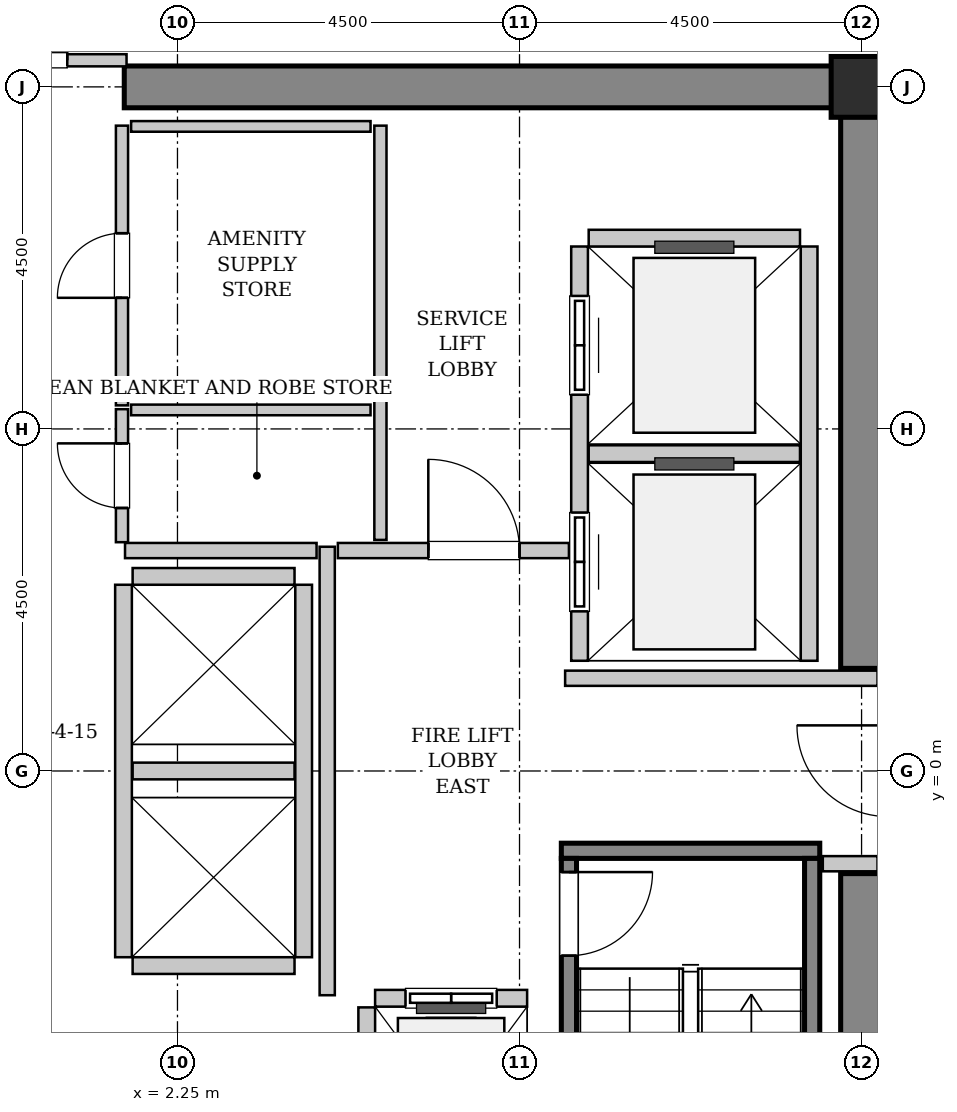
"""IFC4 building model, lengths in metres.
Left out: names, types, materials, properties, quantities, classifications, styles, units other than length and angle.
Written with IfcOpenShell. Run it as: python <this file> out.ifc"""

import sys

from ifc_helpers import new_model, si_unit, direction, frame, frame_2d, origin, origin_2d, place, context, subcontext, project, spatial, rectangle, hollow_rectangle, extrude, source, transform, mapped, element, fill, save


model = new_model("IFC4")
c1 = context("Model", 3, precision=1e-05, world=origin(), true_north=direction((0.0, 1.0)))
c2 = subcontext(c1, "Body", "Model", "MODEL_VIEW")
j1 = project(units=[si_unit("LENGTHUNIT", "METRE"), si_unit("PLANEANGLEUNIT", "RADIAN")], contexts=[c1])
p1 = place(None, origin())
s1 = spatial("IfcSite", under=j1, at=p1, CompositionType="ELEMENT")
p2 = place(p1, origin())
s2 = spatial("IfcBuilding", under=s1, at=p2, CompositionType="ELEMENT")
p3 = place(p2, frame((0.0, 0.0, 186.8)))
s3 = spatial("IfcBuildingStorey", under=s2, at=p3, CompositionType="ELEMENT", Elevation=186.8)
m1 = source(origin(), c2, "Body", "SweptSolid", [
    extrude(rectangle(XDim=9.975, YDim=0.55, at=frame_2d((4.987, 0.0))), origin(), (0.0, 0.0, 1.0), 3.8),
])
p4 = place(p3, frame((1.55, 9.0, 0.0), z_axis=(0.0, 0.0, 1.0), x_axis=(1.0, 0.0, 0.0)))
e1 = element("IfcWall", 1, at=p4, inside=s3, PredefinedType="SHEAR", context=c2, shape_type="MappedRepresentation", body=[
    mapped(m1, transform((0.0, 0.0, 0.0), x_axis=(1.0, 0.0, 0.0), y_axis=(0.0, 1.0, 0.0), z_axis=(0.0, 0.0, 1.0), scale=1.0)),
])
m2 = source(origin(), c2, "Body", "SweptSolid", [
    extrude(rectangle(XDim=7.375, YDim=0.55, at=frame_2d((3.688, 0.0))), origin(), (0.0, 0.0, 1.0), 3.8),
])
for number, where, z_axis, x_axis in (
    (2, (11.25, -8.725, 0.0), (0.0, 0.0, 1.0), (0.0, 1.0, 0.0)),
    (3, (11.25, 1.35, 0.0), (0.0, 0.0, 1.0), (0.0, 1.0, 0.0)),
):
    element("IfcWall", number, at=place(p3, frame(where, z_axis=z_axis, x_axis=x_axis)), inside=s3, PredefinedType="SHEAR", context=c2, shape_type="MappedRepresentation", body=[
        mapped(m2, transform((0.0, 0.0, 0.0), x_axis=(1.0, 0.0, 0.0), y_axis=(0.0, 1.0, 0.0), z_axis=(0.0, 0.0, 1.0), scale=1.0)),
    ])
m3 = source(origin(), c2, "Body", "SweptSolid", [
    extrude(hollow_rectangle(XDim=0.8, YDim=0.8, WallThickness=0.04, InnerFilletRadius=0.04, OuterFilletRadius=0.08, at=origin_2d()), origin(), (0.0, 0.0, 1.0), 3.8),
])
p5 = place(p3, frame((11.25, 9.0, 0.0), z_axis=(0.0, 0.0, 1.0), x_axis=(1.0, 0.0, 0.0)))
e4 = element("IfcColumn", 4, at=p5, inside=s3, PredefinedType="COLUMN", context=c2, shape_type="MappedRepresentation", body=[
    mapped(m3, transform((0.0, 0.0, 0.0), x_axis=(1.0, 0.0, 0.0), y_axis=(0.0, 1.0, 0.0), z_axis=(0.0, 0.0, 1.0), scale=1.0)),
])
m4 = source(origin(), c2, "Body", "SweptSolid", [
    extrude(rectangle(XDim=3.4, YDim=0.2, at=frame_2d((1.7, 0.0))), origin(), (0.0, 0.0, 1.0), 3.8),
])
p6 = place(p3, frame((7.3, -1.05, 0.0), z_axis=(0.0, 0.0, 1.0), x_axis=(1.0, 0.0, 0.0)))
e5 = element("IfcWall", 5, at=p6, inside=s3, PredefinedType="SOLIDWALL", context=c2, shape_type="MappedRepresentation", body=[
    mapped(m4, transform((0.0, 0.0, 0.0), x_axis=(1.0, 0.0, 0.0), y_axis=(0.0, 1.0, 0.0), z_axis=(0.0, 0.0, 1.0), scale=1.0)),
])
m5 = source(origin(), c2, "Body", "SweptSolid", [
    extrude(rectangle(XDim=7.1, YDim=0.2, at=frame_2d((3.55, 0.0))), origin(), (0.0, 0.0, 1.0), 3.8),
])
p7 = place(p3, frame((7.4, -1.15, 0.0), z_axis=(0.0, 0.0, 1.0), x_axis=(0.0, -1.0, 0.0)))
e6 = element("IfcWall", 6, at=p7, inside=s3, PredefinedType="SOLIDWALL", context=c2, shape_type="MappedRepresentation", body=[
    mapped(m5, transform((0.0, 0.0, 0.0), x_axis=(1.0, 0.0, 0.0), y_axis=(0.0, 1.0, 0.0), z_axis=(0.0, 0.0, 1.0), scale=1.0)),
])
p8 = place(p7, frame((0.18, 0.0, 0.0)))
e7 = element("IfcOpeningElement", 7, at=p8, cuts=e6, PredefinedType="OPENING", context=c2, shape_type="SweptSolid", body=[
    extrude(rectangle(XDim=1.1, YDim=2.15, at=frame_2d((0.55, 1.075))), frame((0.0, 0.11, 0.0), z_axis=(0.0, -1.0, 0.0), x_axis=(1.0, 0.0, 0.0)), (0.0, 0.0, 1.0), 0.22),
])
p9 = place(p3, frame((10.6, -1.15, 0.0), z_axis=(0.0, 0.0, 1.0), x_axis=(0.0, -1.0, 0.0)))
e8 = element("IfcWall", 8, at=p9, inside=s3, PredefinedType="SOLIDWALL", context=c2, shape_type="MappedRepresentation", body=[
    mapped(m5, transform((0.0, 0.0, 0.0), x_axis=(1.0, 0.0, 0.0), y_axis=(0.0, 1.0, 0.0), z_axis=(0.0, 0.0, 1.0), scale=1.0)),
])
m6 = source(origin(), c2, "Body", "SweptSolid", [
    extrude(rectangle(XDim=2.0, YDim=0.22, at=frame_2d((1.0, 0.0))), origin(), (0.0, 0.0, 1.0), 3.535),
])
p10 = place(p3, frame((6.85, -2.99, 0.0), z_axis=(0.0, 0.0, 1.0), x_axis=(-1.0, 0.0, 0.0)))
e9 = element("IfcWall", 9, at=p10, inside=s3, PredefinedType="SOLIDWALL", context=c2, shape_type="MappedRepresentation", body=[
    mapped(m6, transform((0.0, 0.0, 0.0), x_axis=(1.0, 0.0, 0.0), y_axis=(0.0, 1.0, 0.0), z_axis=(0.0, 0.0, 1.0), scale=1.0)),
])
p11 = place(p10, frame((0.4, 0.0, 0.0)))
e10 = element("IfcOpeningElement", 10, at=p11, cuts=e9, PredefinedType="OPENING", context=c2, shape_type="SweptSolid", body=[
    extrude(rectangle(XDim=1.2, YDim=2.2, at=frame_2d((0.6, 1.1))), frame((0.0, 0.12, 0.0), z_axis=(0.0, -1.0, 0.0), x_axis=(1.0, 0.0, 0.0)), (0.0, 0.0, 1.0), 0.24),
])
m7 = source(origin(), c2, "Body", "SweptSolid", [
    extrude(rectangle(XDim=2.68, YDim=0.22, at=frame_2d((1.34, 0.0))), origin(), (0.0, 0.0, 1.0), 3.535),
])
p12 = place(p3, frame((4.74, -3.11, 0.0), z_axis=(0.0, 0.0, 1.0), x_axis=(0.0, -1.0, 0.0)))
e11 = element("IfcWall", 11, at=p12, inside=s3, PredefinedType="SOLIDWALL", context=c2, shape_type="MappedRepresentation", body=[
    mapped(m7, transform((0.0, 0.0, 0.0), x_axis=(1.0, 0.0, 0.0), y_axis=(0.0, 1.0, 0.0), z_axis=(0.0, 0.0, 1.0), scale=1.0)),
])
m8 = source(origin(), c2, "Body", "SweptSolid", [
    extrude(rectangle(XDim=5.45, YDim=0.22, at=frame_2d((2.725, 0.0))), origin(), (0.0, 0.0, 1.0), 3.535),
])
p13 = place(p3, frame((7.54, 6.9, 0.0), z_axis=(0.0, 0.0, 1.0), x_axis=(0.0, -1.0, 0.0)))
e12 = element("IfcWall", 12, at=p13, inside=s3, PredefinedType="SOLIDWALL", context=c2, shape_type="MappedRepresentation", body=[
    mapped(m8, transform((0.0, 0.0, 0.0), x_axis=(1.0, 0.0, 0.0), y_axis=(0.0, 1.0, 0.0), z_axis=(0.0, 0.0, 1.0), scale=1.0)),
])
p14 = place(p13, frame((3.5, 0.0, 0.0)))
e13 = element("IfcOpeningElement", 13, at=p14, cuts=e12, PredefinedType="OPENING", context=c2, shape_type="SweptSolid", body=[
    extrude(rectangle(XDim=1.3, YDim=2.3, at=frame_2d((0.65, 1.15))), frame((0.0, 0.12, 0.0), z_axis=(0.0, -1.0, 0.0), x_axis=(1.0, 0.0, 0.0)), (0.0, 0.0, 1.0), 0.24),
])
p15 = place(p13, frame((0.65, 0.0, 0.0)))
e14 = element("IfcOpeningElement", 14, at=p15, cuts=e12, PredefinedType="OPENING", context=c2, shape_type="SweptSolid", body=[
    extrude(rectangle(XDim=1.3, YDim=2.3, at=frame_2d((0.65, 1.15))), frame((0.0, 0.12, 0.0), z_axis=(0.0, -1.0, 0.0), x_axis=(1.0, 0.0, 0.0)), (0.0, 0.0, 1.0), 0.24),
])
p16 = place(p3, frame((10.56, 1.45, 0.0), z_axis=(0.0, 0.0, 1.0), x_axis=(0.0, 1.0, 0.0)))
e15 = element("IfcWall", 15, at=p16, inside=s3, PredefinedType="SOLIDWALL", context=c2, shape_type="MappedRepresentation", body=[
    mapped(m8, transform((0.0, 0.0, 0.0), x_axis=(1.0, 0.0, 0.0), y_axis=(0.0, 1.0, 0.0), z_axis=(0.0, 0.0, 1.0), scale=1.0)),
])
m9 = source(origin(), c2, "Body", "SweptSolid", [
    extrude(rectangle(XDim=2.78, YDim=0.22, at=frame_2d((1.39, 0.0))), origin(), (0.0, 0.0, 1.0), 3.535),
])
for number, where, z_axis, x_axis in (
    (16, (7.66, 4.175, 0.0), (0.0, 0.0, 1.0), (1.0, 0.0, 0.0)),
    (17, (10.44, 7.01, 0.0), (0.0, 0.0, 1.0), (-1.0, 0.0, 0.0)),
):
    element("IfcWall", number, at=place(p3, frame(where, z_axis=z_axis, x_axis=x_axis)), inside=s3, PredefinedType="SOLIDWALL", context=c2, shape_type="MappedRepresentation", body=[
        mapped(m9, transform((0.0, 0.0, 0.0), x_axis=(1.0, 0.0, 0.0), y_axis=(0.0, 1.0, 0.0), z_axis=(0.0, 0.0, 1.0), scale=1.0)),
    ])
m10 = source(origin(), c2, "Body", "SweptSolid", [
    extrude(rectangle(XDim=4.9, YDim=0.22, at=frame_2d((2.45, 0.0))), origin(), (0.0, 0.0, 1.0), 3.535),
])
for number, where, z_axis, x_axis in (
    (18, (1.54, 2.45, 0.0), (0.0, 0.0, 1.0), (0.0, -1.0, 0.0)),
    (19, (3.91, -2.45, 0.0), (0.0, 0.0, 1.0), (0.0, 1.0, 0.0)),
):
    element("IfcWall", number, at=place(p3, frame(where, z_axis=z_axis, x_axis=x_axis)), inside=s3, PredefinedType="SOLIDWALL", context=c2, shape_type="MappedRepresentation", body=[
        mapped(m10, transform((0.0, 0.0, 0.0), x_axis=(1.0, 0.0, 0.0), y_axis=(0.0, 1.0, 0.0), z_axis=(0.0, 0.0, 1.0), scale=1.0)),
    ])
m11 = source(origin(), c2, "Body", "SweptSolid", [
    extrude(rectangle(XDim=2.13, YDim=0.22, at=frame_2d((1.065, 0.0))), origin(), (0.0, 0.0, 1.0), 3.535),
])
for number, where, z_axis, x_axis in (
    (20, (1.66, -2.56, 0.0), (0.0, 0.0, 1.0), (1.0, 0.0, 0.0)),
    (21, (1.66, 0.0, 0.0), (0.0, 0.0, 1.0), (1.0, 0.0, 0.0)),
    (22, (3.79, 2.56, 0.0), (0.0, 0.0, 1.0), (-1.0, 0.0, 0.0)),
):
    element("IfcWall", number, at=place(p3, frame(where, z_axis=z_axis, x_axis=x_axis)), inside=s3, PredefinedType="SOLIDWALL", context=c2, shape_type="MappedRepresentation", body=[
        mapped(m11, transform((0.0, 0.0, 0.0), x_axis=(1.0, 0.0, 0.0), y_axis=(0.0, 1.0, 0.0), z_axis=(0.0, 0.0, 1.0), scale=1.0)),
    ])
m12 = source(origin(), c2, "Body", "SweptSolid", [
    extrude(rectangle(XDim=5.9, YDim=0.2, at=frame_2d((2.95, 0.0))), origin(), (0.0, 0.0, 1.0), 3.535),
])
p17 = place(p3, frame((4.22, -2.95, 0.0), z_axis=(0.0, 0.0, 1.0), x_axis=(0.0, 1.0, 0.0)))
e23 = element("IfcWall", 23, at=p17, inside=s3, PredefinedType="PARTITIONING", context=c2, shape_type="MappedRepresentation", body=[
    mapped(m12, transform((0.0, 0.0, 0.0), x_axis=(1.0, 0.0, 0.0), y_axis=(0.0, 1.0, 0.0), z_axis=(0.0, 0.0, 1.0), scale=1.0)),
])
m13 = source(origin(), c2, "Body", "SweptSolid", [
    extrude(rectangle(XDim=2.52, YDim=0.2, at=frame_2d((1.26, 0.0))), origin(), (0.0, 0.0, 1.0), 3.535),
])
p18 = place(p3, frame((1.56, 2.9, 0.0), z_axis=(0.0, 0.0, 1.0), x_axis=(1.0, 0.0, 0.0)))
e24 = element("IfcWall", 24, at=p18, inside=s3, PredefinedType="PARTITIONING", context=c2, shape_type="MappedRepresentation", body=[
    mapped(m13, transform((0.0, 0.0, 0.0), x_axis=(1.0, 0.0, 0.0), y_axis=(0.0, 1.0, 0.0), z_axis=(0.0, 0.0, 1.0), scale=1.0)),
])
m14 = source(origin(), c2, "Body", "SweptSolid", [
    extrude(rectangle(XDim=3.04, YDim=0.2, at=frame_2d((1.52, 0.0))), origin(), (0.0, 0.0, 1.0), 3.535),
])
p19 = place(p3, frame((4.36, 2.9, 0.0), z_axis=(0.0, 0.0, 1.0), x_axis=(1.0, 0.0, 0.0)))
e25 = element("IfcWall", 25, at=p19, inside=s3, PredefinedType="PARTITIONING", context=c2, shape_type="MappedRepresentation", body=[
    mapped(m14, transform((0.0, 0.0, 0.0), x_axis=(1.0, 0.0, 0.0), y_axis=(0.0, 1.0, 0.0), z_axis=(0.0, 0.0, 1.0), scale=1.0)),
])
p20 = place(p19, frame((1.19, 0.0, 0.0)))
e26 = element("IfcOpeningElement", 26, at=p20, cuts=e25, PredefinedType="OPENING", context=c2, shape_type="SweptSolid", body=[
    extrude(rectangle(XDim=1.2, YDim=2.15, at=frame_2d((0.6, 1.075))), frame((0.0, 0.11, 0.0), z_axis=(0.0, -1.0, 0.0), x_axis=(1.0, 0.0, 0.0)), (0.0, 0.0, 1.0), 0.22),
])
m15 = source(origin(), c2, "Body", "SweptSolid", [
    extrude(rectangle(XDim=4.11, YDim=0.2, at=frame_2d((2.055, 0.0))), origin(), (0.0, 0.0, 1.0), 3.535),
])
p21 = place(p3, frame((7.35, 1.22, 0.0), z_axis=(0.0, 0.0, 1.0), x_axis=(1.0, 0.0, 0.0)))
e27 = element("IfcWall", 27, at=p21, inside=s3, PredefinedType="PARTITIONING", context=c2, shape_type="MappedRepresentation", body=[
    mapped(m15, transform((0.0, 0.0, 0.0), x_axis=(1.0, 0.0, 0.0), y_axis=(0.0, 1.0, 0.0), z_axis=(0.0, 0.0, 1.0), scale=1.0)),
])
m16 = source(origin(), c2, "Body", "SweptSolid", [
    extrude(rectangle(XDim=0.72, YDim=0.2, at=frame_2d((0.36, 0.0))), origin(), (0.0, 0.0, 1.0), 3.535),
])
p22 = place(p3, frame((10.74, -1.22, 0.0), z_axis=(0.0, 0.0, 1.0), x_axis=(1.0, 0.0, 0.0)))
e28 = element("IfcWall", 28, at=p22, inside=s3, PredefinedType="PARTITIONING", context=c2, shape_type="MappedRepresentation", body=[
    mapped(m16, transform((0.0, 0.0, 0.0), x_axis=(1.0, 0.0, 0.0), y_axis=(0.0, 1.0, 0.0), z_axis=(0.0, 0.0, 1.0), scale=1.0)),
])
m17 = source(origin(), c2, "Body", "SweptSolid", [
    extrude(rectangle(XDim=3.16, YDim=0.16, at=frame_2d((1.58, 0.0))), origin(), (0.0, 0.0, 1.0), 2.425),
])
p23 = place(p3, frame((-1.58, 9.35, 0.0), z_axis=(0.0, 0.0, 1.0), x_axis=(1.0, 0.0, 0.0)))
e29 = element("IfcWall", 29, at=p23, inside=s3, PredefinedType="PARTITIONING", context=c2, shape_type="MappedRepresentation", body=[
    mapped(m17, transform((0.0, 0.0, 0.0), x_axis=(1.0, 0.0, 0.0), y_axis=(0.0, 1.0, 0.0), z_axis=(0.0, 0.0, 1.0), scale=1.0)),
])
p24 = place(p23, frame((0.78, 0.0, 0.0)))
e30 = element("IfcOpeningElement", 30, at=p24, cuts=e29, PredefinedType="OPENING", context=c2, shape_type="SweptSolid", body=[
    extrude(rectangle(XDim=1.6, YDim=2.3, at=frame_2d((0.8, 1.15))), frame((0.0, 0.09, 0.0), z_axis=(0.0, -1.0, 0.0), x_axis=(1.0, 0.0, 0.0)), (0.0, 0.0, 1.0), 0.18),
])
m18 = source(origin(), c2, "Body", "SweptSolid", [
    extrude(rectangle(XDim=5.45, YDim=0.16, at=frame_2d((2.725, 0.0))), origin(), (0.0, 0.0, 1.0), 3.535),
])
p25 = place(p3, frame((4.92, 3.04, 0.0), z_axis=(0.0, 0.0, 1.0), x_axis=(0.0, 1.0, 0.0)))
e31 = element("IfcWall", 31, at=p25, inside=s3, PredefinedType="PARTITIONING", context=c2, shape_type="MappedRepresentation", body=[
    mapped(m18, transform((0.0, 0.0, 0.0), x_axis=(1.0, 0.0, 0.0), y_axis=(0.0, 1.0, 0.0), z_axis=(0.0, 0.0, 1.0), scale=1.0)),
])
m19 = source(origin(), c2, "Body", "SweptSolid", [
    extrude(rectangle(XDim=1.75, YDim=0.16, at=frame_2d((0.875, 0.0))), origin(), (0.0, 0.0, 1.0), 3.535),
])
p26 = place(p3, frame((1.52, 3.01, 0.0), z_axis=(0.0, 0.0, 1.0), x_axis=(0.0, 1.0, 0.0)))
e32 = element("IfcWall", 32, at=p26, inside=s3, PredefinedType="PARTITIONING", context=c2, shape_type="MappedRepresentation", body=[
    mapped(m19, transform((0.0, 0.0, 0.0), x_axis=(1.0, 0.0, 0.0), y_axis=(0.0, 1.0, 0.0), z_axis=(0.0, 0.0, 1.0), scale=1.0)),
])
p27 = place(p26, frame((0.45, 0.0, 0.0)))
e33 = element("IfcOpeningElement", 33, at=p27, cuts=e32, PredefinedType="OPENING", context=c2, shape_type="SweptSolid", body=[
    extrude(rectangle(XDim=0.85, YDim=2.1, at=frame_2d((0.425, 1.05))), frame((0.0, 0.09, 0.0), z_axis=(0.0, -1.0, 0.0), x_axis=(1.0, 0.0, 0.0)), (0.0, 0.0, 1.0), 0.18),
])
m20 = source(origin(), c2, "Body", "SweptSolid", [
    extrude(rectangle(XDim=3.15, YDim=0.14, at=frame_2d((1.575, 0.0))), origin(), (0.0, 0.0, 1.0), 3.535),
])
p28 = place(p3, frame((1.64, 4.75, 0.0), z_axis=(0.0, 0.0, 1.0), x_axis=(1.0, 0.0, 0.0)))
e34 = element("IfcWall", 34, at=p28, inside=s3, PredefinedType="PARTITIONING", context=c2, shape_type="MappedRepresentation", body=[
    mapped(m20, transform((0.0, 0.0, 0.0), x_axis=(1.0, 0.0, 0.0), y_axis=(0.0, 1.0, 0.0), z_axis=(0.0, 0.0, 1.0), scale=1.0)),
])
m21 = source(origin(), c2, "Body", "SweptSolid", [
    extrude(rectangle(XDim=3.68, YDim=0.16, at=frame_2d((1.84, 0.0))), origin(), (0.0, 0.0, 1.0), 3.535),
])
p29 = place(p3, frame((1.52, 4.81, 0.0), z_axis=(0.0, 0.0, 1.0), x_axis=(0.0, 1.0, 0.0)))
e35 = element("IfcWall", 35, at=p29, inside=s3, PredefinedType="PARTITIONING", context=c2, shape_type="MappedRepresentation", body=[
    mapped(m21, transform((0.0, 0.0, 0.0), x_axis=(1.0, 0.0, 0.0), y_axis=(0.0, 1.0, 0.0), z_axis=(0.0, 0.0, 1.0), scale=1.0)),
])
p30 = place(p29, frame((1.415, 0.0, 0.0)))
e36 = element("IfcOpeningElement", 36, at=p30, cuts=e35, PredefinedType="OPENING", context=c2, shape_type="SweptSolid", body=[
    extrude(rectangle(XDim=0.85, YDim=2.1, at=frame_2d((0.425, 1.05))), frame((0.0, 0.09, 0.0), z_axis=(0.0, -1.0, 0.0), x_axis=(1.0, 0.0, 0.0)), (0.0, 0.0, 1.0), 0.18),
])
p31 = place(p3, frame((1.64, 8.48, 0.0), z_axis=(0.0, 0.0, 1.0), x_axis=(1.0, 0.0, 0.0)))
e37 = element("IfcWall", 37, at=p31, inside=s3, PredefinedType="PARTITIONING", context=c2, shape_type="MappedRepresentation", body=[
    mapped(m20, transform((0.0, 0.0, 0.0), x_axis=(1.0, 0.0, 0.0), y_axis=(0.0, 1.0, 0.0), z_axis=(0.0, 0.0, 1.0), scale=1.0)),
])
m22 = source(origin(), c2, "Body", "SweptSolid", [
    extrude(rectangle(XDim=1.1, YDim=2.15, at=frame_2d((0.55, 1.075))), frame((0.0, 0.025, 0.0), z_axis=(0.0, -1.0, 0.0), x_axis=(1.0, 0.0, 0.0)), (0.0, 0.0, 1.0), 0.05),
])
p32 = place(p8, origin())
e38 = element("IfcDoor", 38, at=p32, inside=s3, OperationType="SINGLE_SWING_LEFT", PredefinedType="DOOR", context=c2, shape_type="MappedRepresentation", body=[
    mapped(m22, transform((0.0, 0.0, 0.0), x_axis=(1.0, 0.0, 0.0), y_axis=(0.0, 1.0, 0.0), z_axis=(0.0, 0.0, 1.0), scale=1.0)),
])
fill(e7, e38)
m23 = source(origin(), c2, "Body", "SweptSolid", [
    extrude(rectangle(XDim=1.2, YDim=2.2, at=frame_2d((0.6, 1.1))), frame((0.0, 0.025, 0.0), z_axis=(0.0, -1.0, 0.0), x_axis=(1.0, 0.0, 0.0)), (0.0, 0.0, 1.0), 0.05),
])
p33 = place(p11, origin())
e39 = element("IfcDoor", 39, at=p33, inside=s3, OperationType="SLIDING_TO_LEFT", PredefinedType="DOOR", context=c2, shape_type="MappedRepresentation", body=[
    mapped(m23, transform((0.0, 0.0, 0.0), x_axis=(1.0, 0.0, 0.0), y_axis=(0.0, 1.0, 0.0), z_axis=(0.0, 0.0, 1.0), scale=1.0)),
])
fill(e10, e39)
m24 = source(origin(), c2, "Body", "SweptSolid", [
    extrude(rectangle(XDim=1.3, YDim=2.3, at=frame_2d((0.65, 1.15))), frame((0.0, 0.025, 0.0), z_axis=(0.0, -1.0, 0.0), x_axis=(1.0, 0.0, 0.0)), (0.0, 0.0, 1.0), 0.05),
])
p34 = place(p14, origin())
e40 = element("IfcDoor", 40, at=p34, inside=s3, OperationType="SLIDING_TO_RIGHT", PredefinedType="DOOR", context=c2, shape_type="MappedRepresentation", body=[
    mapped(m24, transform((0.0, 0.0, 0.0), x_axis=(1.0, 0.0, 0.0), y_axis=(0.0, 1.0, 0.0), z_axis=(0.0, 0.0, 1.0), scale=1.0)),
])
fill(e13, e40)
p35 = place(p15, origin())
e41 = element("IfcDoor", 41, at=p35, inside=s3, OperationType="SLIDING_TO_RIGHT", PredefinedType="DOOR", context=c2, shape_type="MappedRepresentation", body=[
    mapped(m24, transform((0.0, 0.0, 0.0), x_axis=(1.0, 0.0, 0.0), y_axis=(0.0, 1.0, 0.0), z_axis=(0.0, 0.0, 1.0), scale=1.0)),
])
fill(e14, e41)
m25 = source(origin(), c2, "Body", "SweptSolid", [
    extrude(rectangle(XDim=1.2, YDim=2.15, at=frame_2d((0.6, 1.075))), frame((0.0, 0.025, 0.0), z_axis=(0.0, -1.0, 0.0), x_axis=(1.0, 0.0, 0.0)), (0.0, 0.0, 1.0), 0.05),
])
p36 = place(p20, origin())
e42 = element("IfcDoor", 42, at=p36, inside=s3, OperationType="SINGLE_SWING_LEFT", PredefinedType="DOOR", context=c2, shape_type="MappedRepresentation", body=[
    mapped(m25, transform((0.0, 0.0, 0.0), x_axis=(1.0, 0.0, 0.0), y_axis=(0.0, 1.0, 0.0), z_axis=(0.0, 0.0, 1.0), scale=1.0)),
])
fill(e26, e42)
m26 = source(origin(), c2, "Body", "SweptSolid", [
    extrude(rectangle(XDim=1.6, YDim=2.3, at=frame_2d((0.8, 1.15))), frame((0.0, 0.025, 0.0), z_axis=(0.0, -1.0, 0.0), x_axis=(1.0, 0.0, 0.0)), (0.0, 0.0, 1.0), 0.05),
])
p37 = place(p24, origin())
e43 = element("IfcDoor", 43, at=p37, inside=s3, OperationType="DOUBLE_DOOR_SINGLE_SWING", PredefinedType="DOOR", context=c2, shape_type="MappedRepresentation", body=[
    mapped(m26, transform((0.0, 0.0, 0.0), x_axis=(1.0, 0.0, 0.0), y_axis=(0.0, 1.0, 0.0), z_axis=(0.0, 0.0, 1.0), scale=1.0)),
])
fill(e30, e43)
m27 = source(origin(), c2, "Body", "SweptSolid", [
    extrude(rectangle(XDim=0.85, YDim=2.1, at=frame_2d((0.425, 1.05))), frame((0.0, 0.025, 0.0), z_axis=(0.0, -1.0, 0.0), x_axis=(1.0, 0.0, 0.0)), (0.0, 0.0, 1.0), 0.05),
])
p38 = place(p27, origin())
e44 = element("IfcDoor", 44, at=p38, inside=s3, OperationType="SINGLE_SWING_RIGHT", PredefinedType="DOOR", context=c2, shape_type="MappedRepresentation", body=[
    mapped(m27, transform((0.0, 0.0, 0.0), x_axis=(1.0, 0.0, 0.0), y_axis=(0.0, 1.0, 0.0), z_axis=(0.0, 0.0, 1.0), scale=1.0)),
])
fill(e33, e44)
p39 = place(p30, origin())
e45 = element("IfcDoor", 45, at=p39, inside=s3, OperationType="SINGLE_SWING_LEFT", PredefinedType="DOOR", context=c2, shape_type="MappedRepresentation", body=[
    mapped(m27, transform((0.0, 0.0, 0.0), x_axis=(1.0, 0.0, 0.0), y_axis=(0.0, 1.0, 0.0), z_axis=(0.0, 0.0, 1.0), scale=1.0)),
])
fill(e36, e45)
save(model, sys.argv[1])
